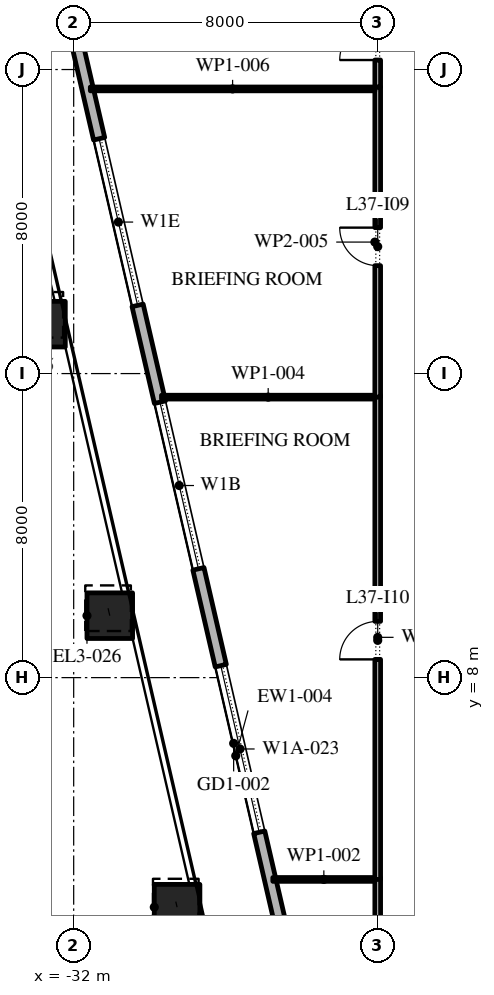
"""IFC4 building model, lengths in metres.
Left out: names, types, materials, properties, quantities, classifications, styles, units other than length and angle.
Written with IfcOpenShell. Run it as: python <this file> out.ifc"""

import sys

from ifc_helpers import new_model, si_unit, direction, frame, frame_2d, origin, origin_2d, place, context, subcontext, project, spatial, rectangle, extrude, element, fill, save


model = new_model("IFC4")
c1 = context("Model", 3, precision=1e-05, world=origin(), true_north=direction((0.0, 1.0)))
c2 = subcontext(c1, "Body", "Model", "MODEL_VIEW")
j1 = project(units=[si_unit("LENGTHUNIT", "METRE"), si_unit("PLANEANGLEUNIT", "RADIAN")], contexts=[c1])
p1 = place(None, origin())
s1 = spatial("IfcSite", under=j1, at=p1, CompositionType="ELEMENT")
p2 = place(p1, origin())
s2 = spatial("IfcBuilding", under=s1, at=p2, CompositionType="ELEMENT")
p3 = place(p2, frame((0.0, 0.0, 171.6)))
s3 = spatial("IfcBuildingStorey", under=s2, at=p3, CompositionType="ELEMENT", Elevation=171.6)
p4 = place(p3, frame((-32.821, 17.3, 0.0), z_axis=(-0.013461799865, 0.058373149415, 0.998204064995), x_axis=(-0.974423835271, -0.224718021653, 0.0)))
e1 = element("IfcColumn", 1, at=p4, inside=s3, PredefinedType="COLUMN", context=c2, shape_type="SweptSolid", body=[
    extrude(rectangle(XDim=1.2, YDim=1.2, at=origin_2d()), origin(), (0.0, 0.0, 1.0), 4.208),
])
p5 = place(p3, frame((-31.05, 9.63, 0.0), z_axis=(-0.010741563911, 0.046740318638, 0.998849318675), x_axis=(-0.974594841169, -0.223975211946, 0.0)))
e2 = element("IfcColumn", 2, at=p5, inside=s3, PredefinedType="COLUMN", context=c2, shape_type="SweptSolid", body=[
    extrude(rectangle(XDim=1.2, YDim=1.2, at=origin_2d()), origin(), (0.0, 0.0, 1.0), 4.205),
])
p6 = place(p3, frame((-29.279, 1.959, 0.0), z_axis=(-0.008132835078, 0.035087374195, 0.999351156084), x_axis=(-0.97417327444, -0.225801752354, 0.0)))
e3 = element("IfcColumn", 3, at=p6, inside=s3, PredefinedType="COLUMN", context=c2, shape_type="SweptSolid", body=[
    extrude(rectangle(XDim=1.2, YDim=1.2, at=origin_2d()), origin(), (0.0, 0.0, 1.0), 4.203),
])
p7 = place(p3, frame((-33.157, 30.092, 0.0), z_axis=(0.0, 0.0, 1.0), x_axis=(0.224950279389, -0.974370243697, 0.0)))
e4 = element("IfcWall", 4, at=p7, inside=s3, PredefinedType="STANDARD", context=c2, shape_type="SweptSolid", body=[
    extrude(rectangle(XDim=49.5, YDim=0.3, at=frame_2d((24.75, 0.0))), origin(), (0.0, 0.0, 1.0), 4.0),
])
p8 = place(p7, frame((2.207, 0.0, 0.0)))
e5 = element("IfcOpeningElement", 5, at=p8, cuts=e4, PredefinedType="OPENING", context=c2, shape_type="SweptSolid", body=[
    extrude(rectangle(XDim=2.4, YDim=3.5, at=frame_2d((1.2, 1.75))), frame((0.0, 0.16, 0.0), z_axis=(0.0, -1.0, 0.0), x_axis=(1.0, 0.0, 0.0)), (0.0, 0.0, 1.0), 0.32),
])
p9 = place(p7, frame((8.121, 0.0, 0.45)))
e6 = element("IfcOpeningElement", 6, at=p9, cuts=e4, PredefinedType="OPENING", context=c2, shape_type="SweptSolid", body=[
    extrude(rectangle(XDim=4.5, YDim=2.825, at=frame_2d((2.25, 1.413))), frame((0.0, 0.16, 0.0), z_axis=(0.0, -1.0, 0.0), x_axis=(1.0, 0.0, 0.0)), (0.0, 0.0, 1.0), 0.32),
])
p10 = place(p7, frame((15.236, 0.0, 0.45)))
e7 = element("IfcOpeningElement", 7, at=p10, cuts=e4, PredefinedType="OPENING", context=c2, shape_type="SweptSolid", body=[
    extrude(rectangle(XDim=4.5, YDim=2.95, at=frame_2d((2.25, 1.475))), frame((0.0, 0.16, 0.0), z_axis=(0.0, -1.0, 0.0), x_axis=(1.0, 0.0, 0.0)), (0.0, 0.0, 1.0), 0.32),
])
p11 = place(p7, frame((22.35, 0.0, 0.45)))
e8 = element("IfcOpeningElement", 8, at=p11, cuts=e4, PredefinedType="OPENING", context=c2, shape_type="SweptSolid", body=[
    extrude(rectangle(XDim=4.5, YDim=3.0, at=frame_2d((2.25, 1.5))), frame((0.0, 0.16, 0.0), z_axis=(0.0, -1.0, 0.0), x_axis=(1.0, 0.0, 0.0)), (0.0, 0.0, 1.0), 0.32),
])
p12 = place(p7, frame((30.514, 0.0, 0.0)))
e9 = element("IfcOpeningElement", 9, at=p12, cuts=e4, PredefinedType="OPENING", context=c2, shape_type="SweptSolid", body=[
    extrude(rectangle(XDim=2.4, YDim=3.5, at=frame_2d((1.2, 1.75))), frame((0.0, 0.16, 0.0), z_axis=(0.0, -1.0, 0.0), x_axis=(1.0, 0.0, 0.0)), (0.0, 0.0, 1.0), 0.32),
])
p13 = place(p7, frame((36.579, 0.0, 0.45)))
e10 = element("IfcOpeningElement", 10, at=p13, cuts=e4, PredefinedType="OPENING", context=c2, shape_type="SweptSolid", body=[
    extrude(rectangle(XDim=4.5, YDim=3.05, at=frame_2d((2.25, 1.525))), frame((0.0, 0.16, 0.0), z_axis=(0.0, -1.0, 0.0), x_axis=(1.0, 0.0, 0.0)), (0.0, 0.0, 1.0), 0.32),
])
p14 = place(p7, frame((43.693, 0.0, 0.45)))
e11 = element("IfcOpeningElement", 11, at=p14, cuts=e4, PredefinedType="OPENING", context=c2, shape_type="SweptSolid", body=[
    extrude(rectangle(XDim=4.5, YDim=3.05, at=frame_2d((2.25, 1.525))), frame((0.0, 0.16, 0.0), z_axis=(0.0, -1.0, 0.0), x_axis=(1.0, 0.0, 0.0)), (0.0, 0.0, 1.0), 0.32),
])
p15 = place(p3, frame((-24.0, -5.075, 0.0), z_axis=(0.0, 0.0, 1.0), x_axis=(0.0, 1.0, 0.0)))
e12 = element("IfcWall", 12, at=p15, inside=s3, PredefinedType="PARTITIONING", context=c2, shape_type="SweptSolid", body=[
    extrude(rectangle(XDim=7.815, YDim=0.15, at=frame_2d((3.907, 0.0))), origin(), (0.0, 0.0, 1.0), 4.0),
])
p16 = place(p3, frame((-24.075, 2.69, 0.0), z_axis=(0.0, 0.0, 1.0), x_axis=(-1.0, 0.0, 0.0)))
e13 = element("IfcWall", 13, at=p16, inside=s3, PredefinedType="PARTITIONING", context=c2, shape_type="SweptSolid", body=[
    extrude(rectangle(XDim=2.685, YDim=0.1, at=frame_2d((1.343, 0.0))), origin(), (0.0, 0.0, 1.0), 4.0),
])
p17 = place(p3, frame((-24.0, 2.69, 0.0), z_axis=(0.0, 0.0, 1.0), x_axis=(0.0, 1.0, 0.0)))
e14 = element("IfcWall", 14, at=p17, inside=s3, PredefinedType="PARTITIONING", context=c2, shape_type="SweptSolid", body=[
    extrude(rectangle(XDim=12.74, YDim=0.15, at=frame_2d((6.37, 0.0))), origin(), (0.0, 0.0, 1.0), 4.0),
])
p18 = place(p17, frame((5.79, 0.0, 0.0)))
e15 = element("IfcOpeningElement", 15, at=p18, cuts=e14, PredefinedType="OPENING", context=c2, shape_type="SweptSolid", body=[
    extrude(rectangle(XDim=1.0, YDim=2.1, at=frame_2d((0.5, 1.05))), frame((0.0, 0.085, 0.0), z_axis=(0.0, -1.0, 0.0), x_axis=(1.0, 0.0, 0.0)), (0.0, 0.0, 1.0), 0.17),
])
p19 = place(p3, frame((-24.075, 15.38, 0.0), z_axis=(0.0, 0.0, 1.0), x_axis=(-1.0, 0.0, 0.0)))
e16 = element("IfcWall", 16, at=p19, inside=s3, PredefinedType="PARTITIONING", context=c2, shape_type="SweptSolid", body=[
    extrude(rectangle(XDim=5.614, YDim=0.1, at=frame_2d((2.807, 0.0))), origin(), (0.0, 0.0, 1.0), 4.0),
])
p20 = place(p3, frame((-24.0, 15.38, 0.0), z_axis=(0.0, 0.0, 1.0), x_axis=(0.0, 1.0, 0.0)))
e17 = element("IfcWall", 17, at=p20, inside=s3, PredefinedType="PARTITIONING", context=c2, shape_type="SweptSolid", body=[
    extrude(rectangle(XDim=8.16, YDim=0.15, at=frame_2d((4.08, 0.0))), origin(), (0.0, 0.0, 1.0), 4.0),
])
p21 = place(p20, frame((3.46, 0.0, 0.0)))
e18 = element("IfcOpeningElement", 18, at=p21, cuts=e17, PredefinedType="OPENING", context=c2, shape_type="SweptSolid", body=[
    extrude(rectangle(XDim=1.0, YDim=2.1, at=frame_2d((0.5, 1.05))), frame((0.0, 0.085, 0.0), z_axis=(0.0, -1.0, 0.0), x_axis=(1.0, 0.0, 0.0)), (0.0, 0.0, 1.0), 0.17),
])
p22 = place(p3, frame((-24.075, 23.49, 0.0), z_axis=(0.0, 0.0, 1.0), x_axis=(-1.0, 0.0, 0.0)))
e19 = element("IfcWall", 19, at=p22, inside=s3, PredefinedType="PARTITIONING", context=c2, shape_type="SweptSolid", body=[
    extrude(rectangle(XDim=7.487, YDim=0.1, at=frame_2d((3.744, 0.0))), origin(), (0.0, 0.0, 1.0), 4.0),
])
p23 = place(p3, frame((-24.0, 23.54, 0.0), z_axis=(0.0, 0.0, 1.0), x_axis=(0.0, 1.0, 0.0)))
e20 = element("IfcWall", 20, at=p23, inside=s3, PredefinedType="PARTITIONING", context=c2, shape_type="SweptSolid", body=[
    extrude(rectangle(XDim=3.935, YDim=0.15, at=frame_2d((1.968, 0.0))), origin(), (0.0, 0.0, 1.0), 4.0),
])
p24 = place(p23, frame((0.71, 0.0, 0.0)))
e21 = element("IfcOpeningElement", 21, at=p24, cuts=e20, PredefinedType="OPENING", context=c2, shape_type="SweptSolid", body=[
    extrude(rectangle(XDim=1.0, YDim=2.1, at=frame_2d((0.5, 1.05))), frame((0.0, 0.085, 0.0), z_axis=(0.0, -1.0, 0.0), x_axis=(1.0, 0.0, 0.0)), (0.0, 0.0, 1.0), 0.17),
])
p25 = place(p9, origin())
e22 = element("IfcWindow", 22, at=p25, inside=s3, PartitioningType="DOUBLE_PANEL_VERTICAL", PredefinedType="WINDOW", context=c2, shape_type="SweptSolid", body=[
    extrude(rectangle(XDim=4.5, YDim=2.825, at=frame_2d((2.25, 1.413))), frame((0.0, 0.03, 0.0), z_axis=(0.0, -1.0, 0.0), x_axis=(1.0, 0.0, 0.0)), (0.0, 0.0, 1.0), 0.06),
])
fill(e6, e22)
p26 = place(p10, origin())
e23 = element("IfcWindow", 23, at=p26, inside=s3, PartitioningType="DOUBLE_PANEL_VERTICAL", PredefinedType="WINDOW", context=c2, shape_type="SweptSolid", body=[
    extrude(rectangle(XDim=4.5, YDim=2.95, at=frame_2d((2.25, 1.475))), frame((0.0, 0.03, 0.0), z_axis=(0.0, -1.0, 0.0), x_axis=(1.0, 0.0, 0.0)), (0.0, 0.0, 1.0), 0.06),
])
fill(e7, e23)
p27 = place(p11, origin())
e24 = element("IfcWindow", 24, at=p27, inside=s3, PartitioningType="DOUBLE_PANEL_VERTICAL", PredefinedType="WINDOW", context=c2, shape_type="SweptSolid", body=[
    extrude(rectangle(XDim=4.5, YDim=3.0, at=frame_2d((2.25, 1.5))), frame((0.0, 0.03, 0.0), z_axis=(0.0, -1.0, 0.0), x_axis=(1.0, 0.0, 0.0)), (0.0, 0.0, 1.0), 0.06),
])
fill(e8, e24)
p28 = place(p24, origin())
e25 = element("IfcDoor", 25, at=p28, inside=s3, OperationType="SINGLE_SWING_RIGHT", PredefinedType="DOOR", context=c2, shape_type="SweptSolid", body=[
    extrude(rectangle(XDim=1.0, YDim=2.1, at=frame_2d((0.5, 1.05))), frame((0.0, 0.025, 0.0), z_axis=(0.0, -1.0, 0.0), x_axis=(1.0, 0.0, 0.0)), (0.0, 0.0, 1.0), 0.05),
])
fill(e21, e25)
p29 = place(p21, origin())
e26 = element("IfcDoor", 26, at=p29, inside=s3, OperationType="SINGLE_SWING_LEFT", PredefinedType="DOOR", context=c2, shape_type="SweptSolid", body=[
    extrude(rectangle(XDim=1.0, YDim=2.1, at=frame_2d((0.5, 1.05))), frame((0.0, 0.025, 0.0), z_axis=(0.0, -1.0, 0.0), x_axis=(1.0, 0.0, 0.0)), (0.0, 0.0, 1.0), 0.05),
])
fill(e18, e26)
p30 = place(p18, origin())
e27 = element("IfcDoor", 27, at=p30, inside=s3, OperationType="SINGLE_SWING_RIGHT", PredefinedType="DOOR", context=c2, shape_type="SweptSolid", body=[
    extrude(rectangle(XDim=1.0, YDim=2.1, at=frame_2d((0.5, 1.05))), frame((0.0, 0.025, 0.0), z_axis=(0.0, -1.0, 0.0), x_axis=(1.0, 0.0, 0.0)), (0.0, 0.0, 1.0), 0.05),
])
fill(e15, e27)
save(model, sys.argv[1])
